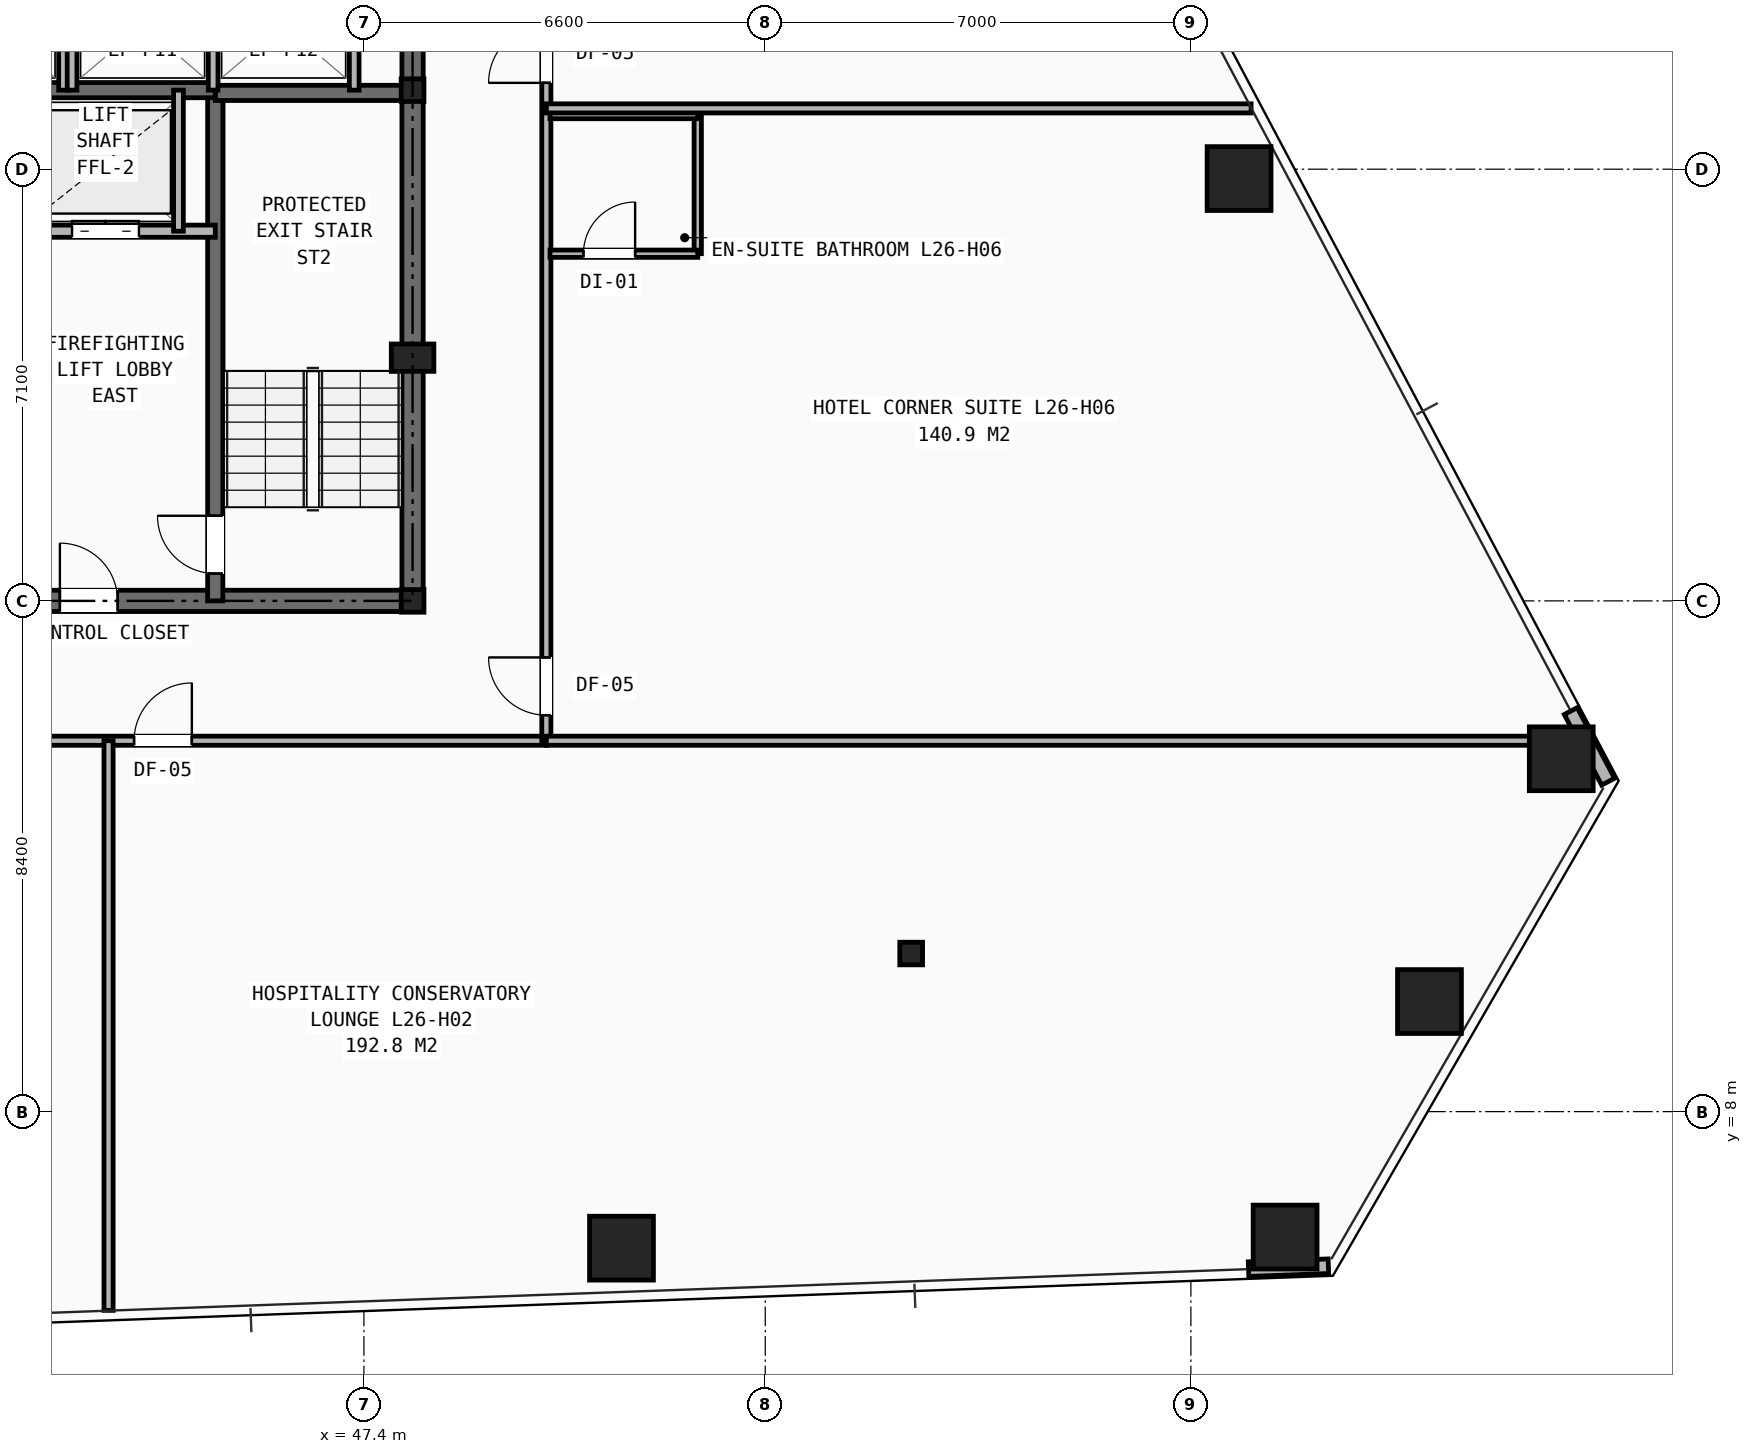
"""IFC4 building model, lengths in metres.
Left out: names, types, materials, properties, quantities, classifications, styles, units other than length and angle.
Written with IfcOpenShell. Run it as: python <this file> out.ifc"""

import sys

from ifc_helpers import new_model, si_unit, direction, frame, frame_2d, origin, origin_2d, place, context, subcontext, project, spatial, rectangle, hollow_rectangle, i_section, extrude, element, fill, save


model = new_model("IFC4")
c1 = context("Model", 3, precision=1e-05, world=origin(), true_north=direction((0.0, 1.0)))
c2 = subcontext(c1, "Body", "Model", "MODEL_VIEW")
j1 = project(units=[si_unit("LENGTHUNIT", "METRE"), si_unit("PLANEANGLEUNIT", "RADIAN")], contexts=[c1])
p1 = place(None, origin())
s1 = spatial("IfcSite", under=j1, at=p1, CompositionType="ELEMENT")
p2 = place(p1, origin())
s2 = spatial("IfcBuilding", under=s1, at=p2, CompositionType="ELEMENT")
p3 = place(p2, frame((0.0, 0.0, 92.6)))
s3 = spatial("IfcBuildingStorey", under=s2, at=p3, CompositionType="ELEMENT", Elevation=92.6)
for number, where, z_axis, x_axis in (
    (1, (48.2, 16.4, 0.0), (0.0, 0.0, 1.0), (1.0, 0.0, 0.0)),
    (2, (48.2, 24.8, 0.0), (0.0, 0.0, 1.0), (1.0, 0.0, 0.0)),
    (3, (56.4, 10.6, 0.0), (0.0, 0.0, 1.0), (1.0, 0.0, 0.0)),
):
    element("IfcColumn", number, at=place(p3, frame(where, z_axis=z_axis, x_axis=x_axis)), inside=s3, PredefinedType="COLUMN", context=c2, shape_type="SweptSolid", body=[
        extrude(i_section(OverallWidth=0.374, OverallDepth=0.372, WebThickness=0.016, FlangeThickness=0.026, at=origin_2d()), origin(), (0.0, 0.0, 1.0), 3.2),
    ])
p4 = place(p3, frame((48.2, 20.4, 0.0), z_axis=(0.0, 0.0, 1.0), x_axis=(1.0, 0.0, 0.0)))
e4 = element("IfcColumn", 4, at=p4, inside=s3, PredefinedType="PILASTER", context=c2, shape_type="SweptSolid", body=[
    extrude(rectangle(XDim=0.7, YDim=0.45, at=origin_2d()), origin(), (0.0, 0.0, 1.0), 3.2),
])
for number, where, z_axis, x_axis in (
    (5, (51.636, 5.754, 0.0), (0.0, 0.0, 1.0), (1.0, 0.0, 0.0)),
    (6, (62.549, 5.937, 0.0), (0.0, 0.0, 1.0), (1.0, 0.0, 0.0)),
    (7, (64.924, 9.81, 0.0), (0.0, 0.0, 1.0), (1.0, 0.0, 0.0)),
    (8, (67.091, 13.803, 0.0), (0.0, 0.0, 1.0), (1.0, 0.0, 0.0)),
    (9, (61.792, 23.346, 0.0), (0.0, 0.0, 1.0), (1.0, 0.0, 0.0)),
):
    element("IfcColumn", number, at=place(p3, frame(where, z_axis=z_axis, x_axis=x_axis)), inside=s3, PredefinedType="COLUMN", context=c2, shape_type="SweptSolid", body=[
        extrude(hollow_rectangle(XDim=1.05, YDim=1.05, WallThickness=0.07, at=origin_2d()), origin(), (0.0, 0.0, 1.0), 3.2),
    ])
for number, where, z_axis, x_axis in (
    (10, (61.948, 5.41, 0.0), (0.0, 0.0, 1.0), (0.999, 0.036, 0.0)),
    (11, (67.862, 13.427, 0.0), (0.0, 0.0, 1.0), (-0.468, 0.884, 0.0)),
):
    element("IfcWall", number, at=place(p3, frame(where, z_axis=z_axis, x_axis=x_axis)), inside=s3, PredefinedType="SHEAR", context=c2, shape_type="SweptSolid", body=[
        extrude(rectangle(XDim=1.313, YDim=0.24, at=frame_2d((0.657, 0.0))), origin(), (0.0, 0.0, 1.0), 2.253),
    ])
p5 = place(p3, frame((31.8, 16.4, 0.0), z_axis=(0.0, 0.0, 1.0), x_axis=(1.0, 0.0, 0.0)))
e12 = element("IfcWall", 12, at=p5, inside=s3, PredefinedType="SHEAR", context=c2, shape_type="SweptSolid", body=[
    extrude(rectangle(XDim=16.4, YDim=0.35, at=frame_2d((8.2, 0.0))), origin(), (0.0, 0.0, 1.0), 2.97),
])
p6 = place(p5, frame((4.2, 0.0, 0.0)))
e13 = element("IfcOpeningElement", 13, at=p6, cuts=e12, PredefinedType="OPENING", context=c2, shape_type="SweptSolid", body=[
    extrude(rectangle(XDim=0.95, YDim=2.1, at=frame_2d((0.475, 1.05))), frame((0.0, 0.185, 0.0), z_axis=(0.0, -1.0, 0.0), x_axis=(1.0, 0.0, 0.0)), (0.0, 0.0, 1.0), 0.37),
])
p7 = place(p5, frame((10.6, 0.0, 0.0)))
e14 = element("IfcOpeningElement", 14, at=p7, cuts=e12, PredefinedType="OPENING", context=c2, shape_type="SweptSolid", body=[
    extrude(rectangle(XDim=0.95, YDim=2.1, at=frame_2d((0.475, 1.05))), frame((0.0, 0.185, 0.0), z_axis=(0.0, -1.0, 0.0), x_axis=(1.0, 0.0, 0.0)), (0.0, 0.0, 1.0), 0.37),
])
p8 = place(p3, frame((48.2, 16.4, 0.0), z_axis=(0.0, 0.0, 1.0), x_axis=(0.0, 1.0, 0.0)))
e15 = element("IfcWall", 15, at=p8, inside=s3, PredefinedType="SHEAR", context=c2, shape_type="SweptSolid", body=[
    extrude(rectangle(XDim=14.8, YDim=0.35, at=frame_2d((7.4, 0.0))), origin(), (0.0, 0.0, 1.0), 2.97),
])
p9 = place(p8, frame((11.0, 0.0, 0.0)))
e16 = element("IfcOpeningElement", 16, at=p9, cuts=e15, PredefinedType="OPENING", context=c2, shape_type="SweptSolid", body=[
    extrude(rectangle(XDim=1.1, YDim=2.15, at=frame_2d((0.55, 1.075))), frame((0.0, 0.185, 0.0), z_axis=(0.0, -1.0, 0.0), x_axis=(1.0, 0.0, 0.0)), (0.0, 0.0, 1.0), 0.37),
])
p10 = place(p3, frame((44.955, 16.4, 0.0), z_axis=(0.0, 0.0, 1.0), x_axis=(0.0, 1.0, 0.0)))
e17 = element("IfcWall", 17, at=p10, inside=s3, PredefinedType="SHEAR", context=c2, shape_type="SweptSolid", body=[
    extrude(rectangle(XDim=8.4, YDim=0.25, at=frame_2d((4.2, 0.0))), origin(), (0.0, 0.0, 1.0), 2.97),
])
p11 = place(p10, frame((0.45, 0.0, 0.0)))
e18 = element("IfcOpeningElement", 18, at=p11, cuts=e17, PredefinedType="OPENING", context=c2, shape_type="SweptSolid", body=[
    extrude(rectangle(XDim=0.95, YDim=2.1, at=frame_2d((0.475, 1.05))), frame((0.0, 0.135, 0.0), z_axis=(0.0, -1.0, 0.0), x_axis=(1.0, 0.0, 0.0)), (0.0, 0.0, 1.0), 0.27),
])
p12 = place(p3, frame((44.955, 24.755, 0.0), z_axis=(0.0, 0.0, 1.0), x_axis=(1.0, 0.0, 0.0)))
e19 = element("IfcWall", 19, at=p12, inside=s3, PredefinedType="SHEAR", context=c2, shape_type="SweptSolid", body=[
    extrude(rectangle(XDim=3.245, YDim=0.25, at=frame_2d((1.623, 0.0))), origin(), (0.0, 0.0, 1.0), 2.97),
])
p13 = place(p3, frame((35.045, 24.8, 0.0), z_axis=(0.0, 0.0, 1.0), x_axis=(1.0, 0.0, 0.0)))
e20 = element("IfcWall", 20, at=p13, inside=s3, PredefinedType="SHEAR", context=c2, shape_type="SweptSolid", body=[
    extrude(rectangle(XDim=9.91, YDim=0.25, at=frame_2d((4.955, 0.0))), origin(), (0.0, 0.0, 1.0), 2.97),
])
p14 = place(p3, frame((35.045, 22.48, 0.0), z_axis=(0.0, 0.0, 1.0), x_axis=(1.0, 0.0, 0.0)))
e21 = element("IfcWall", 21, at=p14, inside=s3, PredefinedType="SOLIDWALL", context=c2, shape_type="SweptSolid", body=[
    extrude(rectangle(XDim=9.91, YDim=0.2, at=frame_2d((4.955, 0.0))), origin(), (0.0, 0.0, 1.0), 2.97),
])
p15 = place(p14, frame((1.255, 0.0, 0.0)))
e22 = element("IfcOpeningElement", 22, at=p15, cuts=e21, PredefinedType="OPENING", context=c2, shape_type="SweptSolid", body=[
    extrude(rectangle(XDim=1.1, YDim=2.15, at=frame_2d((0.55, 1.075))), frame((0.0, 0.11, 0.0), z_axis=(0.0, -1.0, 0.0), x_axis=(1.0, 0.0, 0.0)), (0.0, 0.0, 1.0), 0.22),
])
p16 = place(p14, frame((7.555, 0.0, 0.0)))
e23 = element("IfcOpeningElement", 23, at=p16, cuts=e21, PredefinedType="OPENING", context=c2, shape_type="SweptSolid", body=[
    extrude(rectangle(XDim=1.1, YDim=2.15, at=frame_2d((0.55, 1.075))), frame((0.0, 0.11, 0.0), z_axis=(0.0, -1.0, 0.0), x_axis=(1.0, 0.0, 0.0)), (0.0, 0.0, 1.0), 0.22),
])
p17 = place(p14, frame((4.405, 0.0, 0.0)))
e24 = element("IfcOpeningElement", 24, at=p17, cuts=e21, PredefinedType="OPENING", context=c2, shape_type="SweptSolid", body=[
    extrude(rectangle(XDim=1.1, YDim=2.15, at=frame_2d((0.55, 1.075))), frame((0.0, 0.11, 0.0), z_axis=(0.0, -1.0, 0.0), x_axis=(1.0, 0.0, 0.0)), (0.0, 0.0, 1.0), 0.22),
])
p18 = place(p3, frame((44.35, 22.48, 0.0), z_axis=(0.0, 0.0, 1.0), x_axis=(0.0, 1.0, 0.0)))
e25 = element("IfcWall", 25, at=p18, inside=s3, PredefinedType="SOLIDWALL", context=c2, shape_type="SweptSolid", body=[
    extrude(rectangle(XDim=2.32, YDim=0.16, at=frame_2d((1.16, 0.0))), origin(), (0.0, 0.0, 1.0), 2.97),
])
for number, where, z_axis, x_axis in (
    (26, (42.46, 24.8, 0.0), (0.0, 0.0, 1.0), (0.0, 1.0, 0.0)),
    (27, (42.6, 24.8, 0.0), (0.0, 0.0, 1.0), (0.0, 1.0, 0.0)),
    (28, (44.92, 24.8, 0.0), (0.0, 0.0, 1.0), (0.0, 1.0, 0.0)),
    (29, (47.24, 24.8, 0.0), (0.0, 0.0, 1.0), (0.0, 1.0, 0.0)),
):
    element("IfcWall", number, at=place(p3, frame(where, z_axis=z_axis, x_axis=x_axis)), inside=s3, PredefinedType="SOLIDWALL", context=c2, shape_type="SweptSolid", body=[
        extrude(rectangle(XDim=2.08, YDim=0.16, at=frame_2d((1.04, 0.0))), origin(), (0.0, 0.0, 1.0), 2.97),
    ])
p19 = place(p3, frame((29.6, 14.1, 0.0), z_axis=(0.0, 0.0, 1.0), x_axis=(1.0, 0.0, 0.0)))
e30 = element("IfcWall", 30, at=p19, inside=s3, PredefinedType="PARTITIONING", context=c2, shape_type="SweptSolid", body=[
    extrude(rectangle(XDim=20.8, YDim=0.15, at=frame_2d((10.4, 0.0))), origin(), (0.0, 0.0, 1.0), 2.421),
])
p20 = place(p19, frame((0.57, 0.0, 0.0)))
e31 = element("IfcOpeningElement", 31, at=p20, cuts=e30, PredefinedType="OPENING", context=c2, shape_type="SweptSolid", body=[
    extrude(rectangle(XDim=0.95, YDim=2.1, at=frame_2d((0.475, 1.05))), frame((0.0, 0.085, 0.0), z_axis=(0.0, -1.0, 0.0), x_axis=(1.0, 0.0, 0.0)), (0.0, 0.0, 1.0), 0.17),
])
p21 = place(p19, frame((14.02, 0.0, 0.0)))
e32 = element("IfcOpeningElement", 32, at=p21, cuts=e30, PredefinedType="OPENING", context=c2, shape_type="SweptSolid", body=[
    extrude(rectangle(XDim=0.95, YDim=2.1, at=frame_2d((0.475, 1.05))), frame((0.0, 0.085, 0.0), z_axis=(0.0, -1.0, 0.0), x_axis=(1.0, 0.0, 0.0)), (0.0, 0.0, 1.0), 0.17),
])
p22 = place(p3, frame((50.4, 14.1, 0.0), z_axis=(0.0, 0.0, 1.0), x_axis=(0.0, 1.0, 0.0)))
e33 = element("IfcWall", 33, at=p22, inside=s3, PredefinedType="PARTITIONING", context=c2, shape_type="SweptSolid", body=[
    extrude(rectangle(XDim=21.9, YDim=0.15, at=frame_2d((10.95, 0.0))), origin(), (0.0, 0.0, 1.0), 2.421),
])
p23 = place(p22, frame((0.42, 0.0, 0.0)))
e34 = element("IfcOpeningElement", 34, at=p23, cuts=e33, PredefinedType="OPENING", context=c2, shape_type="SweptSolid", body=[
    extrude(rectangle(XDim=0.95, YDim=2.1, at=frame_2d((0.475, 1.05))), frame((0.0, 0.085, 0.0), z_axis=(0.0, -1.0, 0.0), x_axis=(1.0, 0.0, 0.0)), (0.0, 0.0, 1.0), 0.17),
])
p24 = place(p22, frame((10.82, 0.0, 0.0)))
e35 = element("IfcOpeningElement", 35, at=p24, cuts=e33, PredefinedType="OPENING", context=c2, shape_type="SweptSolid", body=[
    extrude(rectangle(XDim=0.95, YDim=2.1, at=frame_2d((0.475, 1.05))), frame((0.0, 0.085, 0.0), z_axis=(0.0, -1.0, 0.0), x_axis=(1.0, 0.0, 0.0)), (0.0, 0.0, 1.0), 0.17),
])
p25 = place(p3, frame((43.2, 4.731, 0.0), z_axis=(0.0, 0.0, 1.0), x_axis=(0.0, 1.0, 0.0)))
e36 = element("IfcWall", 36, at=p25, inside=s3, PredefinedType="PARTITIONING", context=c2, shape_type="SweptSolid", body=[
    extrude(rectangle(XDim=9.369, YDim=0.15, at=frame_2d((4.685, 0.0))), origin(), (0.0, 0.0, 1.0), 2.258),
])
p26 = place(p3, frame((50.4, 14.1, 0.0), z_axis=(0.0, 0.0, 1.0), x_axis=(1.0, 0.0, 0.0)))
e37 = element("IfcWall", 37, at=p26, inside=s3, PredefinedType="PARTITIONING", context=c2, shape_type="SweptSolid", body=[
    extrude(rectangle(XDim=17.1, YDim=0.15, at=frame_2d((8.55, 0.0))), origin(), (0.0, 0.0, 1.0), 2.258),
])
p27 = place(p3, frame((52.89, 22.11, 0.0), z_axis=(0.0, 0.0, 1.0), x_axis=(0.0, 1.0, 0.0)))
e38 = element("IfcWall", 38, at=p27, inside=s3, PredefinedType="PARTITIONING", context=c2, shape_type="SweptSolid", body=[
    extrude(rectangle(XDim=2.28, YDim=0.12, at=frame_2d((1.14, 0.0))), origin(), (0.0, 0.0, 1.0), 2.97),
])
p28 = place(p3, frame((50.46, 22.11, 0.0), z_axis=(0.0, 0.0, 1.0), x_axis=(1.0, 0.0, 0.0)))
e39 = element("IfcWall", 39, at=p28, inside=s3, PredefinedType="PARTITIONING", context=c2, shape_type="SweptSolid", body=[
    extrude(rectangle(XDim=2.43, YDim=0.12, at=frame_2d((1.215, 0.0))), origin(), (0.0, 0.0, 1.0), 2.97),
])
p29 = place(p28, frame((0.55, 0.0, 0.0)))
e40 = element("IfcOpeningElement", 40, at=p29, cuts=e39, PredefinedType="OPENING", context=c2, shape_type="SweptSolid", body=[
    extrude(rectangle(XDim=0.85, YDim=2.05, at=frame_2d((0.425, 1.025))), frame((0.0, 0.07, 0.0), z_axis=(0.0, -1.0, 0.0), x_axis=(1.0, 0.0, 0.0)), (0.0, 0.0, 1.0), 0.14),
])
p30 = place(p3, frame((50.46, 24.39, 0.0), z_axis=(0.0, 0.0, 1.0), x_axis=(1.0, 0.0, 0.0)))
e41 = element("IfcWall", 41, at=p30, inside=s3, PredefinedType="PARTITIONING", context=c2, shape_type="SweptSolid", body=[
    extrude(rectangle(XDim=2.43, YDim=0.12, at=frame_2d((1.215, 0.0))), origin(), (0.0, 0.0, 1.0), 2.97),
])
p31 = place(p3, frame((50.4, 24.5, 0.0), z_axis=(0.0, 0.0, 1.0), x_axis=(1.0, 0.0, 0.0)))
e42 = element("IfcWall", 42, at=p31, inside=s3, PredefinedType="PARTITIONING", context=c2, shape_type="SweptSolid", body=[
    extrude(rectangle(XDim=11.59, YDim=0.15, at=frame_2d((5.795, 0.0))), origin(), (0.0, 0.0, 1.0), 2.258),
])
p32 = place(p11, origin())
e43 = element("IfcDoor", 43, at=p32, inside=s3, OperationType="SINGLE_SWING_RIGHT", PredefinedType="DOOR", context=c2, shape_type="SweptSolid", body=[
    extrude(rectangle(XDim=0.95, YDim=2.1, at=frame_2d((0.475, 1.05))), frame((0.0, 0.025, 0.0), z_axis=(0.0, -1.0, 0.0), x_axis=(1.0, 0.0, 0.0)), (0.0, 0.0, 1.0), 0.05),
])
fill(e18, e43)
p33 = place(p7, origin())
e44 = element("IfcDoor", 44, at=p33, inside=s3, OperationType="SINGLE_SWING_LEFT", PredefinedType="DOOR", context=c2, shape_type="SweptSolid", body=[
    extrude(rectangle(XDim=0.95, YDim=2.1, at=frame_2d((0.475, 1.05))), frame((0.0, 0.025, 0.0), z_axis=(0.0, -1.0, 0.0), x_axis=(1.0, 0.0, 0.0)), (0.0, 0.0, 1.0), 0.05),
])
fill(e14, e44)
p34 = place(p16, origin())
e45 = element("IfcDoor", 45, at=p34, inside=s3, OperationType="DOUBLE_DOOR_SLIDING", PredefinedType="DOOR", context=c2, shape_type="SweptSolid", body=[
    extrude(rectangle(XDim=1.1, YDim=2.15, at=frame_2d((0.55, 1.075))), frame((0.0, 0.025, 0.0), z_axis=(0.0, -1.0, 0.0), x_axis=(1.0, 0.0, 0.0)), (0.0, 0.0, 1.0), 0.05),
])
fill(e23, e45)
p35 = place(p21, origin())
e46 = element("IfcDoor", 46, at=p35, inside=s3, OperationType="SINGLE_SWING_RIGHT", PredefinedType="DOOR", context=c2, shape_type="SweptSolid", body=[
    extrude(rectangle(XDim=0.95, YDim=2.1, at=frame_2d((0.475, 1.05))), frame((0.0, 0.025, 0.0), z_axis=(0.0, -1.0, 0.0), x_axis=(1.0, 0.0, 0.0)), (0.0, 0.0, 1.0), 0.05),
])
fill(e32, e46)
p36 = place(p23, origin())
e47 = element("IfcDoor", 47, at=p36, inside=s3, OperationType="SINGLE_SWING_RIGHT", PredefinedType="DOOR", context=c2, shape_type="SweptSolid", body=[
    extrude(rectangle(XDim=0.95, YDim=2.1, at=frame_2d((0.475, 1.05))), frame((0.0, 0.025, 0.0), z_axis=(0.0, -1.0, 0.0), x_axis=(1.0, 0.0, 0.0)), (0.0, 0.0, 1.0), 0.05),
])
fill(e34, e47)
p37 = place(p29, origin())
e48 = element("IfcDoor", 48, at=p37, inside=s3, OperationType="SINGLE_SWING_RIGHT", PredefinedType="DOOR", context=c2, shape_type="SweptSolid", body=[
    extrude(rectangle(XDim=0.85, YDim=2.05, at=frame_2d((0.425, 1.025))), frame((0.0, 0.025, 0.0), z_axis=(0.0, -1.0, 0.0), x_axis=(1.0, 0.0, 0.0)), (0.0, 0.0, 1.0), 0.05),
])
fill(e40, e48)
p38 = place(p24, origin())
e49 = element("IfcDoor", 49, at=p38, inside=s3, OperationType="SINGLE_SWING_LEFT", PredefinedType="DOOR", context=c2, shape_type="SweptSolid", body=[
    extrude(rectangle(XDim=0.95, YDim=2.1, at=frame_2d((0.475, 1.05))), frame((0.0, 0.025, 0.0), z_axis=(0.0, -1.0, 0.0), x_axis=(1.0, 0.0, 0.0)), (0.0, 0.0, 1.0), 0.05),
])
fill(e35, e49)
save(model, sys.argv[1])
